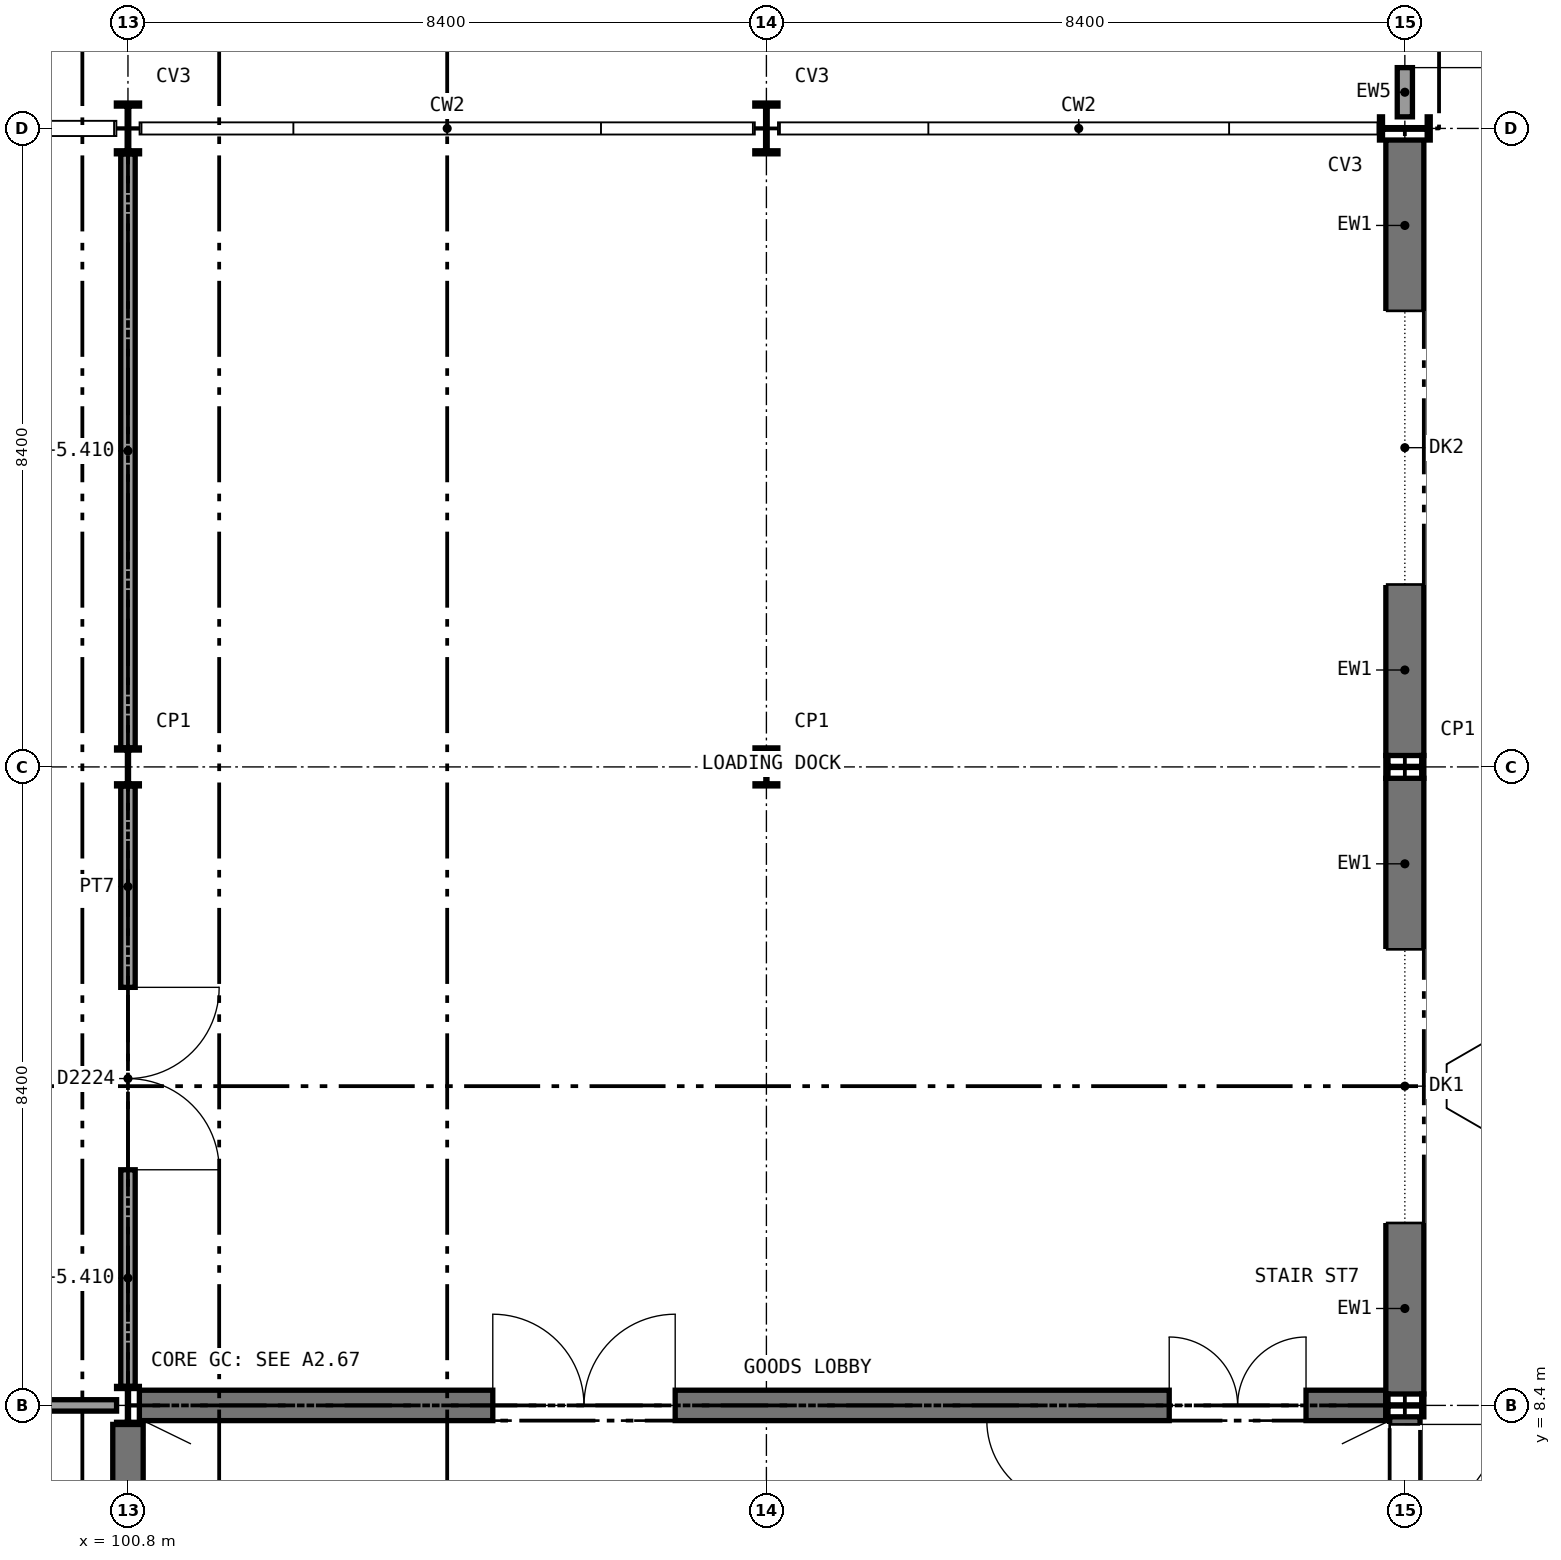
"""IFC4 building model, lengths in metres.
Left out: names, types, materials, properties, quantities, classifications, styles, units other than length and angle.
Written with IfcOpenShell. Run it as: python <this file> out.ifc"""

import sys

from ifc_helpers import new_model, si_unit, direction, frame, frame_2d, origin, origin_2d, place, context, subcontext, project, spatial, rectangle, i_section, extrude, element, fill, save


model = new_model("IFC4")
c1 = context("Model", 3, precision=1e-05, world=origin(), true_north=direction((0.0, 1.0)))
c2 = subcontext(c1, "Body", "Model", "MODEL_VIEW")
j1 = project(units=[si_unit("LENGTHUNIT", "METRE"), si_unit("PLANEANGLEUNIT", "RADIAN")], contexts=[c1])
p1 = place(None, origin())
s1 = spatial("IfcSite", under=j1, at=p1, CompositionType="ELEMENT")
p2 = place(p1, origin())
s2 = spatial("IfcBuilding", under=s1, at=p2, CompositionType="ELEMENT")
p3 = place(p2, origin())
s3 = spatial("IfcBuildingStorey", under=s2, at=p3, CompositionType="ELEMENT", Elevation=0.0)
p4 = place(p3, frame((100.95, 8.4, 0.0), z_axis=(0.0, 0.0, 1.0), x_axis=(1.0, 0.0, 0.0)))
e1 = element("IfcWall", 1, at=p4, inside=s3, PredefinedType="SHEAR", context=c2, shape_type="SweptSolid", body=[
    extrude(rectangle(XDim=16.4, YDim=0.4, at=frame_2d((8.2, 0.0))), origin(), (0.0, 0.0, 1.0), 5.85),
])
p5 = place(p4, frame((13.55, 0.0, 0.0)))
e2 = element("IfcOpeningElement", 2, at=p5, cuts=e1, PredefinedType="OPENING", context=c2, shape_type="SweptSolid", body=[
    extrude(rectangle(XDim=1.8, YDim=2.1, at=frame_2d((0.9, 1.05))), frame((0.0, 0.21, 0.0), z_axis=(0.0, -1.0, 0.0), x_axis=(1.0, 0.0, 0.0)), (0.0, 0.0, 1.0), 0.42),
])
p6 = place(p4, frame((4.65, 0.0, 0.0)))
e3 = element("IfcOpeningElement", 3, at=p6, cuts=e1, PredefinedType="OPENING", context=c2, shape_type="SweptSolid", body=[
    extrude(rectangle(XDim=2.4, YDim=2.4, at=frame_2d((1.2, 1.2))), frame((0.0, 0.21, 0.0), z_axis=(0.0, -1.0, 0.0), x_axis=(1.0, 0.0, 0.0)), (0.0, 0.0, 1.0), 0.42),
])
p7 = place(p3, frame((100.8, 0.25, 0.0), z_axis=(0.0, 0.0, 1.0), x_axis=(0.0, 1.0, 0.0)))
e4 = element("IfcWall", 4, at=p7, inside=s3, PredefinedType="SHEAR", context=c2, shape_type="SweptSolid", body=[
    extrude(rectangle(XDim=7.9, YDim=0.4, at=frame_2d((3.95, 0.0))), origin(), (0.0, 0.0, 1.0), 5.85),
])
p8 = place(p3, frame((117.6, 0.15, 0.0), z_axis=(0.0, 0.0, 1.0), x_axis=(0.0, 1.0, 0.0)))
e5 = element("IfcWall", 5, at=p8, inside=s3, PredefinedType="SHEAR", context=c2, shape_type="SweptSolid", body=[
    extrude(rectangle(XDim=8.1, YDim=0.4, at=frame_2d((4.05, 0.0))), origin(), (0.0, 0.0, 1.0), 5.85),
])
p9 = place(p8, frame((6.8, 0.0, 0.0)))
e6 = element("IfcOpeningElement", 6, at=p9, cuts=e5, PredefinedType="OPENING", context=c2, shape_type="SweptSolid", body=[
    extrude(rectangle(XDim=1.2, YDim=2.1, at=frame_2d((0.6, 1.05))), frame((0.0, 0.21, 0.0), z_axis=(0.0, -1.0, 0.0), x_axis=(1.0, 0.0, 0.0)), (0.0, 0.0, 1.0), 0.42),
])
for number, where, z_axis, x_axis in (
    (7, (100.8, 8.4, 0.0), (0.0, 0.0, 1.0), (1.0, 0.0, 0.0)),
    (8, (100.8, 16.8, 0.0), (0.0, 0.0, 1.0), (1.0, 0.0, 0.0)),
):
    element("IfcColumn", number, at=place(p3, frame(where, z_axis=z_axis, x_axis=x_axis)), inside=s3, PredefinedType="COLUMN", context=c2, shape_type="SweptSolid", body=[
        extrude(i_section(OverallWidth=0.3, OverallDepth=0.5, WebThickness=0.014, FlangeThickness=0.028, FilletRadius=0.027, at=origin_2d()), origin(), (0.0, 0.0, 1.0), 6.0),
    ])
p10 = place(p3, frame((100.8, 25.2, 0.0), z_axis=(0.0, 0.0, 1.0), x_axis=(1.0, 0.0, 0.0)))
e9 = element("IfcColumn", 9, at=p10, inside=s3, PredefinedType="COLUMN", context=c2, shape_type="SweptSolid", body=[
    extrude(i_section(OverallWidth=0.305, OverallDepth=0.668, WebThickness=0.021, FlangeThickness=0.04, FilletRadius=0.027, at=origin_2d()), origin(), (0.0, 0.0, 1.0), 6.0),
])
p11 = place(p3, frame((109.2, 16.8, 0.0), z_axis=(0.0, 0.0, 1.0), x_axis=(1.0, 0.0, 0.0)))
e10 = element("IfcColumn", 10, at=p11, inside=s3, PredefinedType="COLUMN", context=c2, shape_type="SweptSolid", body=[
    extrude(i_section(OverallWidth=0.3, OverallDepth=0.5, WebThickness=0.014, FlangeThickness=0.028, FilletRadius=0.027, at=origin_2d()), origin(), (0.0, 0.0, 1.0), 6.0),
])
p12 = place(p3, frame((109.2, 25.2, 0.0), z_axis=(0.0, 0.0, 1.0), x_axis=(1.0, 0.0, 0.0)))
e11 = element("IfcColumn", 11, at=p12, inside=s3, PredefinedType="COLUMN", context=c2, shape_type="SweptSolid", body=[
    extrude(i_section(OverallWidth=0.305, OverallDepth=0.668, WebThickness=0.021, FlangeThickness=0.04, FilletRadius=0.027, at=origin_2d()), origin(), (0.0, 0.0, 1.0), 6.0),
])
for number, where, z_axis, x_axis in (
    (12, (117.6, 8.4, 0.0), (0.0, 0.0, 1.0), (0.0, 1.0, 0.0)),
    (13, (117.6, 16.8, 0.0), (0.0, 0.0, 1.0), (0.0, 1.0, 0.0)),
):
    element("IfcColumn", number, at=place(p3, frame(where, z_axis=z_axis, x_axis=x_axis)), inside=s3, PredefinedType="COLUMN", context=c2, shape_type="SweptSolid", body=[
        extrude(i_section(OverallWidth=0.3, OverallDepth=0.5, WebThickness=0.014, FlangeThickness=0.028, FilletRadius=0.027, at=origin_2d()), origin(), (0.0, 0.0, 1.0), 6.0),
    ])
p13 = place(p3, frame((117.6, 25.2, 0.0), z_axis=(0.0, 0.0, 1.0), x_axis=(0.0, 1.0, 0.0)))
e14 = element("IfcColumn", 14, at=p13, inside=s3, PredefinedType="COLUMN", context=c2, shape_type="SweptSolid", body=[
    extrude(i_section(OverallWidth=0.305, OverallDepth=0.668, WebThickness=0.021, FlangeThickness=0.04, FilletRadius=0.027, at=origin_2d()), origin(), (0.0, 0.0, 1.0), 6.0),
])
p14 = place(p3, frame((92.55, 8.4, 0.0), z_axis=(0.0, 0.0, 1.0), x_axis=(1.0, 0.0, 0.0)))
e15 = element("IfcWall", 15, at=p14, inside=s3, PredefinedType="SOLIDWALL", context=c2, shape_type="SweptSolid", body=[
    extrude(rectangle(XDim=8.1, YDim=0.15, at=frame_2d((4.05, 0.0))), origin(), (0.0, 0.0, 1.0), 5.52),
])
p15 = place(p14, frame((3.35, 0.0, 0.0)))
e16 = element("IfcOpeningElement", 16, at=p15, cuts=e15, PredefinedType="OPENING", context=c2, shape_type="SweptSolid", body=[
    extrude(rectangle(XDim=1.5, YDim=2.1, at=frame_2d((0.75, 1.05))), frame((0.0, 0.085, 0.0), z_axis=(0.0, -1.0, 0.0), x_axis=(1.0, 0.0, 0.0)), (0.0, 0.0, 1.0), 0.17),
])
p16 = place(p3, frame((100.8, 8.65, 0.0), z_axis=(0.0, 0.0, 1.0), x_axis=(0.0, 1.0, 0.0)))
e17 = element("IfcWall", 17, at=p16, inside=s3, PredefinedType="SOLIDWALL", context=c2, shape_type="SweptSolid", body=[
    extrude(rectangle(XDim=7.9, YDim=0.19, at=frame_2d((3.95, 0.0))), origin(), (0.0, 0.0, 1.0), 5.41),
])
p17 = place(p16, frame((2.85, 0.0, 0.0)))
e18 = element("IfcOpeningElement", 18, at=p17, cuts=e17, PredefinedType="OPENING", context=c2, shape_type="SweptSolid", body=[
    extrude(rectangle(XDim=2.4, YDim=2.4, at=frame_2d((1.2, 1.2))), frame((0.0, 0.105, 0.0), z_axis=(0.0, -1.0, 0.0), x_axis=(1.0, 0.0, 0.0)), (0.0, 0.0, 1.0), 0.21),
])
p18 = place(p3, frame((100.8, 17.05, 0.0), z_axis=(0.0, 0.0, 1.0), x_axis=(0.0, 1.0, 0.0)))
e19 = element("IfcWall", 19, at=p18, inside=s3, PredefinedType="SOLIDWALL", context=c2, shape_type="SweptSolid", body=[
    extrude(rectangle(XDim=7.816, YDim=0.19, at=frame_2d((3.908, 0.0))), origin(), (0.0, 0.0, 1.0), 5.41),
])
p19 = place(p3, frame((117.6, 25.353, 0.0), z_axis=(0.0, 0.0, 1.0), x_axis=(0.0, 1.0, 0.0)))
e20 = element("IfcWall", 20, at=p19, inside=s3, PredefinedType="STANDARD", context=c2, shape_type="SweptSolid", body=[
    extrude(rectangle(XDim=12.294, YDim=0.2, at=frame_2d((6.147, 0.0))), origin(), (0.0, 0.0, 1.0), 6.0),
])
p20 = place(p19, frame((0.647, 0.0, 0.0)))
e21 = element("IfcOpeningElement", 21, at=p20, cuts=e20, PredefinedType="OPENING", context=c2, shape_type="SweptSolid", body=[
    extrude(rectangle(XDim=2.6, YDim=3.0, at=frame_2d((1.3, 1.5))), frame((0.0, 0.11, 0.0), z_axis=(0.0, -1.0, 0.0), x_axis=(1.0, 0.0, 0.0)), (0.0, 0.0, 1.0), 0.22),
])
p21 = place(p19, frame((4.847, 0.0, 0.0)))
e22 = element("IfcOpeningElement", 22, at=p21, cuts=e20, PredefinedType="OPENING", context=c2, shape_type="SweptSolid", body=[
    extrude(rectangle(XDim=2.6, YDim=3.0, at=frame_2d((1.3, 1.5))), frame((0.0, 0.11, 0.0), z_axis=(0.0, -1.0, 0.0), x_axis=(1.0, 0.0, 0.0)), (0.0, 0.0, 1.0), 0.22),
])
p22 = place(p19, frame((9.047, 0.0, 0.0)))
e23 = element("IfcOpeningElement", 23, at=p22, cuts=e20, PredefinedType="OPENING", context=c2, shape_type="SweptSolid", body=[
    extrude(rectangle(XDim=2.6, YDim=3.0, at=frame_2d((1.3, 1.5))), frame((0.0, 0.11, 0.0), z_axis=(0.0, -1.0, 0.0), x_axis=(1.0, 0.0, 0.0)), (0.0, 0.0, 1.0), 0.22),
])
p23 = place(p3, frame((117.6, 8.55, 0.0), z_axis=(0.0, 0.0, 1.0), x_axis=(0.0, 1.0, 0.0)))
e24 = element("IfcWall", 24, at=p23, inside=s3, PredefinedType="STANDARD", context=c2, shape_type="SweptSolid", body=[
    extrude(rectangle(XDim=8.1, YDim=0.5, at=frame_2d((4.05, 0.0))), origin(), (0.0, 0.0, 1.0), 5.85),
])
p24 = place(p23, frame((2.25, 0.0, 0.0)))
e25 = element("IfcOpeningElement", 25, at=p24, cuts=e24, PredefinedType="OPENING", context=c2, shape_type="SweptSolid", body=[
    extrude(rectangle(XDim=3.6, YDim=4.5, at=frame_2d((1.8, 2.25))), frame((0.0, 0.26, 0.0), z_axis=(0.0, -1.0, 0.0), x_axis=(1.0, 0.0, 0.0)), (0.0, 0.0, 1.0), 0.52),
])
p25 = place(p3, frame((117.6, 16.95, 0.0), z_axis=(0.0, 0.0, 1.0), x_axis=(0.0, 1.0, 0.0)))
e26 = element("IfcWall", 26, at=p25, inside=s3, PredefinedType="STANDARD", context=c2, shape_type="SweptSolid", body=[
    extrude(rectangle(XDim=8.097, YDim=0.5, at=frame_2d((4.049, 0.0))), origin(), (0.0, 0.0, 1.0), 5.85),
])
p26 = place(p25, frame((2.25, 0.0, 0.0)))
e27 = element("IfcOpeningElement", 27, at=p26, cuts=e26, PredefinedType="OPENING", context=c2, shape_type="SweptSolid", body=[
    extrude(rectangle(XDim=3.6, YDim=4.5, at=frame_2d((1.8, 2.25))), frame((0.0, 0.26, 0.0), z_axis=(0.0, -1.0, 0.0), x_axis=(1.0, 0.0, 0.0)), (0.0, 0.0, 1.0), 0.52),
])
p27 = place(p3, frame((113.2, 0.2, 0.0), z_axis=(0.0, 0.0, 1.0), x_axis=(0.0, 1.0, 0.0)))
e28 = element("IfcWall", 28, at=p27, inside=s3, PredefinedType="SHEAR", context=c2, shape_type="SweptSolid", body=[
    extrude(rectangle(XDim=8.0, YDim=0.2, at=frame_2d((4.0, 0.0))), origin(), (0.0, 0.0, 1.0), 5.85),
])
p28 = place(p27, frame((6.9, 0.0, 0.0)))
e29 = element("IfcOpeningElement", 29, at=p28, cuts=e28, PredefinedType="OPENING", context=c2, shape_type="SweptSolid", body=[
    extrude(rectangle(XDim=1.11, YDim=2.1, at=frame_2d((0.555, 1.05))), frame((0.0, 0.11, 0.0), z_axis=(0.0, -1.0, 0.0), x_axis=(1.0, 0.0, 0.0)), (0.0, 0.0, 1.0), 0.22),
])
p29 = place(p17, frame((2.4, 0.0, 0.0), z_axis=(0.0, 0.0, 1.0), x_axis=(-1.0, 0.0, 0.0)))
e30 = element("IfcDoor", 30, at=p29, inside=s3, OperationType="DOUBLE_DOOR_SINGLE_SWING", PredefinedType="DOOR", context=c2, shape_type="SweptSolid", body=[
    extrude(rectangle(XDim=2.4, YDim=2.4, at=frame_2d((1.2, 1.2))), frame((0.0, 0.025, 0.0), z_axis=(0.0, -1.0, 0.0), x_axis=(1.0, 0.0, 0.0)), (0.0, 0.0, 1.0), 0.05),
])
fill(e18, e30)
p30 = place(p20, frame((2.6, 0.0, 0.0), z_axis=(0.0, 0.0, 1.0), x_axis=(-1.0, 0.0, 0.0)))
e31 = element("IfcDoor", 31, at=p30, inside=s3, OperationType="DOUBLE_DOOR_SINGLE_SWING", PredefinedType="DOOR", context=c2, shape_type="SweptSolid", body=[
    extrude(rectangle(XDim=2.6, YDim=3.0, at=frame_2d((1.3, 1.5))), frame((0.0, 0.025, 0.0), z_axis=(0.0, -1.0, 0.0), x_axis=(1.0, 0.0, 0.0)), (0.0, 0.0, 1.0), 0.05),
])
fill(e21, e31)
p31 = place(p24, frame((3.6, 0.0, 0.0), z_axis=(0.0, 0.0, 1.0), x_axis=(-1.0, 0.0, 0.0)))
e32 = element("IfcDoor", 32, at=p31, inside=s3, OperationType="ROLLINGUP", PredefinedType="DOOR", context=c2, shape_type="SweptSolid", body=[
    extrude(rectangle(XDim=3.6, YDim=4.5, at=frame_2d((1.8, 2.25))), frame((0.0, 0.025, 0.0), z_axis=(0.0, -1.0, 0.0), x_axis=(1.0, 0.0, 0.0)), (0.0, 0.0, 1.0), 0.05),
])
fill(e25, e32)
p32 = place(p26, frame((3.6, 0.0, 0.0), z_axis=(0.0, 0.0, 1.0), x_axis=(-1.0, 0.0, 0.0)))
e33 = element("IfcDoor", 33, at=p32, inside=s3, OperationType="ROLLINGUP", PredefinedType="DOOR", context=c2, shape_type="SweptSolid", body=[
    extrude(rectangle(XDim=3.6, YDim=4.5, at=frame_2d((1.8, 2.25))), frame((0.0, 0.025, 0.0), z_axis=(0.0, -1.0, 0.0), x_axis=(1.0, 0.0, 0.0)), (0.0, 0.0, 1.0), 0.05),
])
fill(e27, e33)
p33 = place(p28, origin())
e34 = element("IfcDoor", 34, at=p33, inside=s3, OperationType="SINGLE_SWING_RIGHT", PredefinedType="DOOR", context=c2, shape_type="SweptSolid", body=[
    extrude(rectangle(XDim=1.1, YDim=2.1, at=frame_2d((0.55, 1.05))), frame((0.0, 0.025, 0.0), z_axis=(0.0, -1.0, 0.0), x_axis=(1.0, 0.0, 0.0)), (0.0, 0.0, 1.0), 0.05),
])
fill(e29, e34)
p34 = place(p5, origin())
e35 = element("IfcDoor", 35, at=p34, inside=s3, OperationType="DOUBLE_DOOR_SINGLE_SWING", PredefinedType="DOOR", context=c2, shape_type="SweptSolid", body=[
    extrude(rectangle(XDim=1.8, YDim=2.1, at=frame_2d((0.9, 1.05))), frame((0.0, 0.025, 0.0), z_axis=(0.0, -1.0, 0.0), x_axis=(1.0, 0.0, 0.0)), (0.0, 0.0, 1.0), 0.05),
])
fill(e2, e35)
p35 = place(p6, origin())
e36 = element("IfcDoor", 36, at=p35, inside=s3, OperationType="DOUBLE_DOOR_SINGLE_SWING", PredefinedType="DOOR", context=c2, shape_type="SweptSolid", body=[
    extrude(rectangle(XDim=2.4, YDim=2.4, at=frame_2d((1.2, 1.2))), frame((0.0, 0.025, 0.0), z_axis=(0.0, -1.0, 0.0), x_axis=(1.0, 0.0, 0.0)), (0.0, 0.0, 1.0), 0.05),
])
fill(e3, e36)
p36 = place(p9, frame((1.2, 0.0, 0.0), z_axis=(0.0, 0.0, 1.0), x_axis=(-1.0, 0.0, 0.0)))
e37 = element("IfcDoor", 37, at=p36, inside=s3, OperationType="SINGLE_SWING_LEFT", PredefinedType="DOOR", context=c2, shape_type="SweptSolid", body=[
    extrude(rectangle(XDim=1.2, YDim=2.1, at=frame_2d((0.6, 1.05))), frame((0.0, 0.025, 0.0), z_axis=(0.0, -1.0, 0.0), x_axis=(1.0, 0.0, 0.0)), (0.0, 0.0, 1.0), 0.05),
])
fill(e6, e37)
save(model, sys.argv[1])
